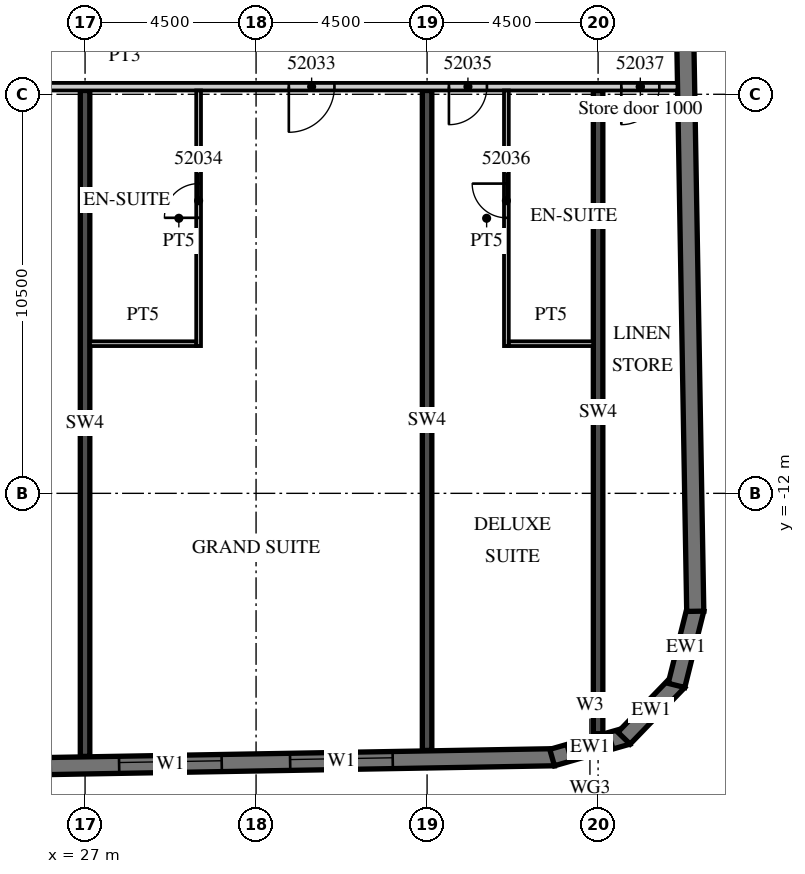
"""IFC4 building model, lengths in metres.
Left out: names, types, materials, properties, quantities, classifications, styles, units other than length and angle.
Written with IfcOpenShell. Run it as: python <this file> out.ifc"""

import sys

from ifc_helpers import new_model, si_unit, direction, frame, frame_2d, origin, place, context, subcontext, project, spatial, polyline, rectangle, outline, extrude, element, fill, save


model = new_model("IFC4")
c1 = context("Model", 3, precision=1e-05, world=origin(), true_north=direction((0.0, 1.0)))
c2 = subcontext(c1, "Body", "Model", "MODEL_VIEW")
j1 = project(units=[si_unit("LENGTHUNIT", "METRE"), si_unit("PLANEANGLEUNIT", "RADIAN")], contexts=[c1])
p1 = place(None, origin())
s1 = spatial("IfcSite", under=j1, at=p1, CompositionType="ELEMENT")
p2 = place(p1, origin())
s2 = spatial("IfcBuilding", under=s1, at=p2, CompositionType="ELEMENT")
p3 = place(p2, frame((0.0, 0.0, 217.7)))
s3 = spatial("IfcBuildingStorey", under=s2, at=p3, CompositionType="ELEMENT", Elevation=217.7)
p4 = place(p3, frame((27.0, -18.922, 0.0), z_axis=(0.0, 0.0, 1.0), x_axis=(0.0, 1.0, 0.0)))
e1 = element("IfcWall", 1, at=p4, inside=s3, PredefinedType="SHEAR", context=c2, shape_type="SweptSolid", body=[
    extrude(rectangle(XDim=17.522, YDim=0.25, at=frame_2d((8.761, 0.0))), origin(), (0.0, 0.0, 1.0), 3.3),
])
p5 = place(p3, frame((36.0, -18.765, 0.0), z_axis=(0.0, 0.0, 1.0), x_axis=(0.0, 1.0, 0.0)))
e2 = element("IfcWall", 2, at=p5, inside=s3, PredefinedType="SHEAR", context=c2, shape_type="SweptSolid", body=[
    extrude(rectangle(XDim=17.365, YDim=0.25, at=frame_2d((8.683, 0.0))), origin(), (0.0, 0.0, 1.0), 3.3),
])
p6 = place(p3, frame((40.5, -18.325, 0.0), z_axis=(0.0, 0.0, 1.0), x_axis=(0.0, 1.0, 0.0)))
e3 = element("IfcWall", 3, at=p6, inside=s3, PredefinedType="SHEAR", context=c2, shape_type="SweptSolid", body=[
    extrude(rectangle(XDim=16.925, YDim=0.25, at=frame_2d((8.463, 0.0))), origin(), (0.0, 0.0, 1.0), 3.3),
])
p7 = place(p3, frame((-13.504, -19.866, 0.0), z_axis=(0.0, 0.0, 1.0), x_axis=(0.999847672978, 0.017453676992, 0.0)))
e4 = element("IfcWall", 4, at=p7, inside=s3, PredefinedType="SOLIDWALL", context=c2, shape_type="SweptSolid", body=[
    extrude(rectangle(XDim=52.86, YDim=0.45, at=frame_2d((26.43, 0.0))), origin(), (0.0, 0.0, 1.0), 3.02),
])
p8 = place(p7, frame((0.9, 0.0, 0.45)))
e5 = element("IfcOpeningElement", 5, at=p8, cuts=e4, PredefinedType="OPENING", context=c2, shape_type="SweptSolid", body=[
    extrude(rectangle(XDim=2.7, YDim=2.25, at=frame_2d((1.35, 1.125))), frame((0.0, 0.235, 0.0), z_axis=(0.0, -1.0, 0.0), x_axis=(1.0, 0.0, 0.0)), (0.0, 0.0, 1.0), 0.47),
])
p9 = place(p7, frame((5.401, 0.0, 0.45)))
e6 = element("IfcOpeningElement", 6, at=p9, cuts=e4, PredefinedType="OPENING", context=c2, shape_type="SweptSolid", body=[
    extrude(rectangle(XDim=2.7, YDim=2.25, at=frame_2d((1.35, 1.125))), frame((0.0, 0.235, 0.0), z_axis=(0.0, -1.0, 0.0), x_axis=(1.0, 0.0, 0.0)), (0.0, 0.0, 1.0), 0.47),
])
p10 = place(p7, frame((9.902, 0.0, 0.45)))
e7 = element("IfcOpeningElement", 7, at=p10, cuts=e4, PredefinedType="OPENING", context=c2, shape_type="SweptSolid", body=[
    extrude(rectangle(XDim=2.7, YDim=2.25, at=frame_2d((1.35, 1.125))), frame((0.0, 0.235, 0.0), z_axis=(0.0, -1.0, 0.0), x_axis=(1.0, 0.0, 0.0)), (0.0, 0.0, 1.0), 0.47),
])
p11 = place(p7, frame((14.402, 0.0, 0.45)))
e8 = element("IfcOpeningElement", 8, at=p11, cuts=e4, PredefinedType="OPENING", context=c2, shape_type="SweptSolid", body=[
    extrude(rectangle(XDim=2.7, YDim=2.25, at=frame_2d((1.35, 1.125))), frame((0.0, 0.235, 0.0), z_axis=(0.0, -1.0, 0.0), x_axis=(1.0, 0.0, 0.0)), (0.0, 0.0, 1.0), 0.47),
])
p12 = place(p7, frame((18.903, 0.0, 0.45)))
e9 = element("IfcOpeningElement", 9, at=p12, cuts=e4, PredefinedType="OPENING", context=c2, shape_type="SweptSolid", body=[
    extrude(rectangle(XDim=2.7, YDim=2.25, at=frame_2d((1.35, 1.125))), frame((0.0, 0.235, 0.0), z_axis=(0.0, -1.0, 0.0), x_axis=(1.0, 0.0, 0.0)), (0.0, 0.0, 1.0), 0.47),
])
p13 = place(p7, frame((23.404, 0.0, 0.45)))
e10 = element("IfcOpeningElement", 10, at=p13, cuts=e4, PredefinedType="OPENING", context=c2, shape_type="SweptSolid", body=[
    extrude(rectangle(XDim=2.7, YDim=2.25, at=frame_2d((1.35, 1.125))), frame((0.0, 0.235, 0.0), z_axis=(0.0, -1.0, 0.0), x_axis=(1.0, 0.0, 0.0)), (0.0, 0.0, 1.0), 0.47),
])
p14 = place(p7, frame((27.904, 0.0, 0.45)))
e11 = element("IfcOpeningElement", 11, at=p14, cuts=e4, PredefinedType="OPENING", context=c2, shape_type="SweptSolid", body=[
    extrude(rectangle(XDim=2.7, YDim=2.25, at=frame_2d((1.35, 1.125))), frame((0.0, 0.235, 0.0), z_axis=(0.0, -1.0, 0.0), x_axis=(1.0, 0.0, 0.0)), (0.0, 0.0, 1.0), 0.47),
])
p15 = place(p7, frame((32.405, 0.0, 0.45)))
e12 = element("IfcOpeningElement", 12, at=p15, cuts=e4, PredefinedType="OPENING", context=c2, shape_type="SweptSolid", body=[
    extrude(rectangle(XDim=2.7, YDim=2.25, at=frame_2d((1.35, 1.125))), frame((0.0, 0.235, 0.0), z_axis=(0.0, -1.0, 0.0), x_axis=(1.0, 0.0, 0.0)), (0.0, 0.0, 1.0), 0.47),
])
p16 = place(p7, frame((36.906, 0.0, 0.45)))
e13 = element("IfcOpeningElement", 13, at=p16, cuts=e4, PredefinedType="OPENING", context=c2, shape_type="SweptSolid", body=[
    extrude(rectangle(XDim=2.7, YDim=2.25, at=frame_2d((1.35, 1.125))), frame((0.0, 0.235, 0.0), z_axis=(0.0, -1.0, 0.0), x_axis=(1.0, 0.0, 0.0)), (0.0, 0.0, 1.0), 0.47),
])
p17 = place(p7, frame((41.406, 0.0, 0.45)))
e14 = element("IfcOpeningElement", 14, at=p17, cuts=e4, PredefinedType="OPENING", context=c2, shape_type="SweptSolid", body=[
    extrude(rectangle(XDim=2.7, YDim=2.25, at=frame_2d((1.35, 1.125))), frame((0.0, 0.235, 0.0), z_axis=(0.0, -1.0, 0.0), x_axis=(1.0, 0.0, 0.0)), (0.0, 0.0, 1.0), 0.47),
])
p18 = place(p7, frame((45.907, 0.0, 0.45)))
e15 = element("IfcOpeningElement", 15, at=p18, cuts=e4, PredefinedType="OPENING", context=c2, shape_type="SweptSolid", body=[
    extrude(rectangle(XDim=2.7, YDim=2.25, at=frame_2d((1.35, 1.125))), frame((0.0, 0.235, 0.0), z_axis=(0.0, -1.0, 0.0), x_axis=(1.0, 0.0, 0.0)), (0.0, 0.0, 1.0), 0.47),
])
p19 = place(p3, frame((39.29, -18.952, 0.0), z_axis=(0.0, 0.0, 1.0), x_axis=(0.961247584925, 0.275686562016, 0.0)))
e16 = element("IfcWall", 16, at=p19, inside=s3, PredefinedType="SOLIDWALL", context=c2, shape_type="SweptSolid", body=[
    extrude(outline(polyline([(0.0, -0.225), (2.071, -0.225), (1.95, 0.225), (0.121, 0.225), (0.0, -0.225)])), origin(), (0.0, 0.0, 1.0), 3.02),
])
p20 = place(p19, frame((0.435, 0.0, 0.45)))
e17 = element("IfcOpeningElement", 17, at=p20, cuts=e16, PredefinedType="OPENING", context=c2, shape_type="SweptSolid", body=[
    extrude(rectangle(XDim=1.2, YDim=2.25, at=frame_2d((0.6, 1.125))), frame((0.0, 0.235, 0.0), z_axis=(0.0, -1.0, 0.0), x_axis=(1.0, 0.0, 0.0)), (0.0, 0.0, 1.0), 0.47),
])
p21 = place(p3, frame((41.181, -18.442, 0.0), z_axis=(0.0, 0.0, 1.0), x_axis=(0.694678672846, 0.719320193998, 0.0)))
e18 = element("IfcWall", 18, at=p21, inside=s3, PredefinedType="SOLIDWALL", context=c2, shape_type="SweptSolid", body=[
    extrude(outline(polyline([(0.0, -0.225), (2.071, -0.225), (1.95, 0.225), (0.121, 0.225), (0.0, -0.225)])), origin(), (0.0, 0.0, 1.0), 3.02),
])
p22 = place(p3, frame((42.563, -17.054, 0.0), z_axis=(0.0, 0.0, 1.0), x_axis=(0.241841950319, 0.970315655375, 0.0)))
e19 = element("IfcWall", 19, at=p22, inside=s3, PredefinedType="SOLIDWALL", context=c2, shape_type="SweptSolid", body=[
    extrude(outline(polyline([(0.0, -0.225), (2.071, -0.225), (1.95, 0.225), (0.121, 0.225), (0.0, -0.225)])), origin(), (0.0, 0.0, 1.0), 3.02),
])
p23 = place(p3, frame((43.057, -15.103, 0.0), z_axis=(0.0, 0.0, 1.0), x_axis=(-0.017452408953, 0.999847695112, 0.0)))
e20 = element("IfcWall", 20, at=p23, inside=s3, PredefinedType="SOLIDWALL", context=c2, shape_type="SweptSolid", body=[
    extrude(rectangle(XDim=33.0, YDim=0.45, at=frame_2d((16.5, 0.0))), origin(), (0.0, 0.0, 1.0), 3.02),
])
p24 = place(p3, frame((13.5, -1.3, 0.0), z_axis=(0.0, 0.0, 1.0), x_axis=(1.0, 0.0, 0.0)))
e21 = element("IfcWall", 21, at=p24, inside=s3, PredefinedType="PARTITIONING", context=c2, shape_type="SweptSolid", body=[
    extrude(rectangle(XDim=29.091, YDim=0.2, at=frame_2d((14.545, 0.0))), origin(), (0.0, 0.0, 1.0), 3.02),
])
p25 = place(p24, frame((0.575, 0.0, 0.0)))
e22 = element("IfcOpeningElement", 22, at=p25, cuts=e21, PredefinedType="OPENING", context=c2, shape_type="SweptSolid", body=[
    extrude(rectangle(XDim=1.0, YDim=2.1, at=frame_2d((0.5, 1.05))), frame((0.0, 0.11, 0.0), z_axis=(0.0, -1.0, 0.0), x_axis=(1.0, 0.0, 0.0)), (0.0, 0.0, 1.0), 0.22),
])
p26 = place(p24, frame((9.862, 0.0, 0.0)))
e23 = element("IfcOpeningElement", 23, at=p26, cuts=e21, PredefinedType="OPENING", context=c2, shape_type="SweptSolid", body=[
    extrude(rectangle(XDim=1.2, YDim=2.1, at=frame_2d((0.6, 1.05))), frame((0.0, 0.11, 0.0), z_axis=(0.0, -1.0, 0.0), x_axis=(1.0, 0.0, 0.0)), (0.0, 0.0, 1.0), 0.22),
])
p27 = place(p24, frame((18.862, 0.0, 0.0)))
e24 = element("IfcOpeningElement", 24, at=p27, cuts=e21, PredefinedType="OPENING", context=c2, shape_type="SweptSolid", body=[
    extrude(rectangle(XDim=1.2, YDim=2.1, at=frame_2d((0.6, 1.05))), frame((0.0, 0.11, 0.0), z_axis=(0.0, -1.0, 0.0), x_axis=(1.0, 0.0, 0.0)), (0.0, 0.0, 1.0), 0.22),
])
p28 = place(p24, frame((23.075, 0.0, 0.0)))
e25 = element("IfcOpeningElement", 25, at=p28, cuts=e21, PredefinedType="OPENING", context=c2, shape_type="SweptSolid", body=[
    extrude(rectangle(XDim=1.0, YDim=2.1, at=frame_2d((0.5, 1.05))), frame((0.0, 0.11, 0.0), z_axis=(0.0, -1.0, 0.0), x_axis=(1.0, 0.0, 0.0)), (0.0, 0.0, 1.0), 0.22),
])
p29 = place(p24, frame((27.611, 0.0, 0.0)))
e26 = element("IfcOpeningElement", 26, at=p29, cuts=e21, PredefinedType="OPENING", context=c2, shape_type="SweptSolid", body=[
    extrude(rectangle(XDim=1.0, YDim=2.4, at=frame_2d((0.5, 1.2))), frame((0.0, 0.11, 0.0), z_axis=(0.0, -1.0, 0.0), x_axis=(1.0, 0.0, 0.0)), (0.0, 0.0, 1.0), 0.22),
])
p30 = place(p3, frame((29.988, -8.125, 0.0), z_axis=(0.0, 0.0, 1.0), x_axis=(0.0, 1.0, 0.0)))
e27 = element("IfcWall", 27, at=p30, inside=s3, PredefinedType="PARTITIONING", context=c2, shape_type="SweptSolid", body=[
    extrude(rectangle(XDim=6.725, YDim=0.125, at=frame_2d((3.363, 0.0))), origin(), (0.0, 0.0, 1.0), 3.02),
])
p31 = place(p30, frame((3.375, 0.0, 0.0)))
e28 = element("IfcOpeningElement", 28, at=p31, cuts=e27, PredefinedType="OPENING", context=c2, shape_type="SweptSolid", body=[
    extrude(rectangle(XDim=0.9, YDim=2.1, at=frame_2d((0.45, 1.05))), frame((0.0, 0.073, 0.0), z_axis=(0.0, -1.0, 0.0), x_axis=(1.0, 0.0, 0.0)), (0.0, 0.0, 1.0), 0.145),
])
p32 = place(p3, frame((27.125, -8.062, 0.0), z_axis=(0.0, 0.0, 1.0), x_axis=(1.0, 0.0, 0.0)))
e29 = element("IfcWall", 29, at=p32, inside=s3, PredefinedType="PARTITIONING", context=c2, shape_type="SweptSolid", body=[
    extrude(rectangle(XDim=2.8, YDim=0.125, at=frame_2d((1.4, 0.0))), origin(), (0.0, 0.0, 1.0), 3.02),
])
p33 = place(p3, frame((38.087, -8.125, 0.0), z_axis=(0.0, 0.0, 1.0), x_axis=(0.0, 1.0, 0.0)))
e30 = element("IfcWall", 30, at=p33, inside=s3, PredefinedType="PARTITIONING", context=c2, shape_type="SweptSolid", body=[
    extrude(rectangle(XDim=6.725, YDim=0.125, at=frame_2d((3.363, 0.0))), origin(), (0.0, 0.0, 1.0), 3.02),
])
p34 = place(p33, frame((3.375, 0.0, 0.0)))
e31 = element("IfcOpeningElement", 31, at=p34, cuts=e30, PredefinedType="OPENING", context=c2, shape_type="SweptSolid", body=[
    extrude(rectangle(XDim=0.9, YDim=2.1, at=frame_2d((0.45, 1.05))), frame((0.0, 0.073, 0.0), z_axis=(0.0, -1.0, 0.0), x_axis=(1.0, 0.0, 0.0)), (0.0, 0.0, 1.0), 0.145),
])
p35 = place(p3, frame((38.15, -8.062, 0.0), z_axis=(0.0, 0.0, 1.0), x_axis=(1.0, 0.0, 0.0)))
e32 = element("IfcWall", 32, at=p35, inside=s3, PredefinedType="PARTITIONING", context=c2, shape_type="SweptSolid", body=[
    extrude(rectangle(XDim=2.225, YDim=0.125, at=frame_2d((1.113, 0.0))), origin(), (0.0, 0.0, 1.0), 3.02),
])
p36 = place(p17, origin())
e33 = element("IfcWindow", 33, at=p36, inside=s3, PartitioningType="SINGLE_PANEL", PredefinedType="WINDOW", context=c2, shape_type="SweptSolid", body=[
    extrude(rectangle(XDim=2.7, YDim=2.25, at=frame_2d((1.35, 1.125))), frame((0.0, 0.09, 0.0), z_axis=(0.0, -1.0, 0.0), x_axis=(1.0, 0.0, 0.0)), (0.0, 0.0, 1.0), 0.06),
])
fill(e14, e33)
p37 = place(p18, origin())
e34 = element("IfcWindow", 34, at=p37, inside=s3, PartitioningType="SINGLE_PANEL", PredefinedType="WINDOW", context=c2, shape_type="SweptSolid", body=[
    extrude(rectangle(XDim=2.7, YDim=2.25, at=frame_2d((1.35, 1.125))), frame((0.0, 0.09, 0.0), z_axis=(0.0, -1.0, 0.0), x_axis=(1.0, 0.0, 0.0)), (0.0, 0.0, 1.0), 0.06),
])
fill(e15, e34)
p38 = place(p20, origin())
e35 = element("IfcWindow", 35, at=p38, inside=s3, PartitioningType="SINGLE_PANEL", PredefinedType="WINDOW", context=c2, shape_type="SweptSolid", body=[
    extrude(rectangle(XDim=1.2, YDim=2.25, at=frame_2d((0.6, 1.125))), frame((0.0, 0.09, 0.0), z_axis=(0.0, -1.0, 0.0), x_axis=(1.0, 0.0, 0.0)), (0.0, 0.0, 1.0), 0.06),
])
fill(e17, e35)
p39 = place(p27, origin())
e36 = element("IfcDoor", 36, at=p39, inside=s3, OperationType="SINGLE_SWING_LEFT", PredefinedType="DOOR", context=c2, shape_type="SweptSolid", body=[
    extrude(rectangle(XDim=1.2, YDim=2.1, at=frame_2d((0.6, 1.05))), frame((0.0, 0.025, 0.0), z_axis=(0.0, -1.0, 0.0), x_axis=(1.0, 0.0, 0.0)), (0.0, 0.0, 1.0), 0.05),
])
fill(e24, e36)
p40 = place(p31, origin())
e37 = element("IfcDoor", 37, at=p40, inside=s3, OperationType="SINGLE_SWING_LEFT", PredefinedType="DOOR", context=c2, shape_type="SweptSolid", body=[
    extrude(rectangle(XDim=0.9, YDim=2.1, at=frame_2d((0.45, 1.05))), frame((0.0, 0.025, 0.0), z_axis=(0.0, -1.0, 0.0), x_axis=(1.0, 0.0, 0.0)), (0.0, 0.0, 1.0), 0.05),
])
fill(e28, e37)
p41 = place(p28, origin())
e38 = element("IfcDoor", 38, at=p41, inside=s3, OperationType="SINGLE_SWING_LEFT", PredefinedType="DOOR", context=c2, shape_type="SweptSolid", body=[
    extrude(rectangle(XDim=1.0, YDim=2.1, at=frame_2d((0.5, 1.05))), frame((0.0, 0.025, 0.0), z_axis=(0.0, -1.0, 0.0), x_axis=(1.0, 0.0, 0.0)), (0.0, 0.0, 1.0), 0.05),
])
fill(e25, e38)
p42 = place(p34, origin())
e39 = element("IfcDoor", 39, at=p42, inside=s3, OperationType="SINGLE_SWING_RIGHT", PredefinedType="DOOR", context=c2, shape_type="SweptSolid", body=[
    extrude(rectangle(XDim=0.9, YDim=2.1, at=frame_2d((0.45, 1.05))), frame((0.0, 0.025, 0.0), z_axis=(0.0, -1.0, 0.0), x_axis=(1.0, 0.0, 0.0)), (0.0, 0.0, 1.0), 0.05),
])
fill(e31, e39)
p43 = place(p29, origin())
e40 = element("IfcDoor", 40, at=p43, inside=s3, OperationType="SINGLE_SWING_LEFT", PredefinedType="DOOR", context=c2, shape_type="SweptSolid", body=[
    extrude(rectangle(XDim=1.0, YDim=2.4, at=frame_2d((0.5, 1.2))), frame((0.0, 0.025, 0.0), z_axis=(0.0, -1.0, 0.0), x_axis=(1.0, 0.0, 0.0)), (0.0, 0.0, 1.0), 0.05),
])
fill(e26, e40)
save(model, sys.argv[1])
